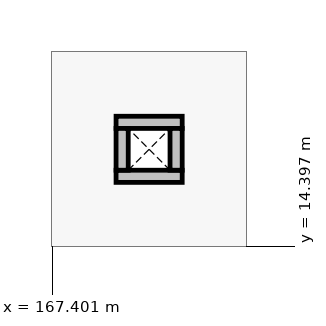
"""IFC4 building model, lengths in metres.
Left out: names, types, materials, properties, quantities, classifications, styles, units other than length and angle.
Written with IfcOpenShell. Run it as: python <this file> out.ifc"""

import sys

from ifc_helpers import new_model, si_unit, direction, frame, frame_2d, origin, place, context, subcontext, project, spatial, rectangle, extrude, element, save


model = new_model("IFC4")
c1 = context("Model", 3, precision=1e-05, world=origin(), true_north=direction((0.0, 1.0)))
c2 = subcontext(c1, "Body", "Model", "MODEL_VIEW")
j1 = project(units=[si_unit("LENGTHUNIT", "METRE"), si_unit("PLANEANGLEUNIT", "RADIAN")], contexts=[c1])
p1 = place(None, origin())
s1 = spatial("IfcSite", under=j1, at=p1, CompositionType="ELEMENT")
p2 = place(p1, origin())
s2 = spatial("IfcBuilding", under=s1, at=p2, CompositionType="ELEMENT")
p3 = place(p2, frame((0.0, 0.0, 8.4)))
s3 = spatial("IfcBuildingStorey", under=s2, at=p3, CompositionType="ELEMENT", Elevation=8.4)
for number, where, z_axis, x_axis in (
    (1, (168.24, 15.32, 0.0), (0.0, 0.0, 1.0), (1.0, 0.0, 0.0)),
    (2, (168.24, 16.03, 0.0), (0.0, 0.0, 1.0), (1.0, 0.0, 0.0)),
):
    element("IfcWall", number, at=place(p3, frame(where, z_axis=z_axis, x_axis=x_axis)), inside=s3, PredefinedType="PARTITIONING", context=c2, shape_type="SweptSolid", body=[
        extrude(rectangle(XDim=0.87, YDim=0.16, at=frame_2d((0.435, 0.0))), origin(), (0.0, 0.0, 1.0), 3.35),
    ])
for number, where, z_axis, x_axis in (
    (3, (168.32, 15.4, 0.0), (0.0, 0.0, 1.0), (0.0, 1.0, 0.0)),
    (4, (169.03, 15.4, 0.0), (0.0, 0.0, 1.0), (0.0, 1.0, 0.0)),
):
    element("IfcWall", number, at=place(p3, frame(where, z_axis=z_axis, x_axis=x_axis)), inside=s3, PredefinedType="PARTITIONING", context=c2, shape_type="SweptSolid", body=[
        extrude(rectangle(XDim=0.55, YDim=0.16, at=frame_2d((0.275, 0.0))), origin(), (0.0, 0.0, 1.0), 3.35),
    ])
save(model, sys.argv[1])
